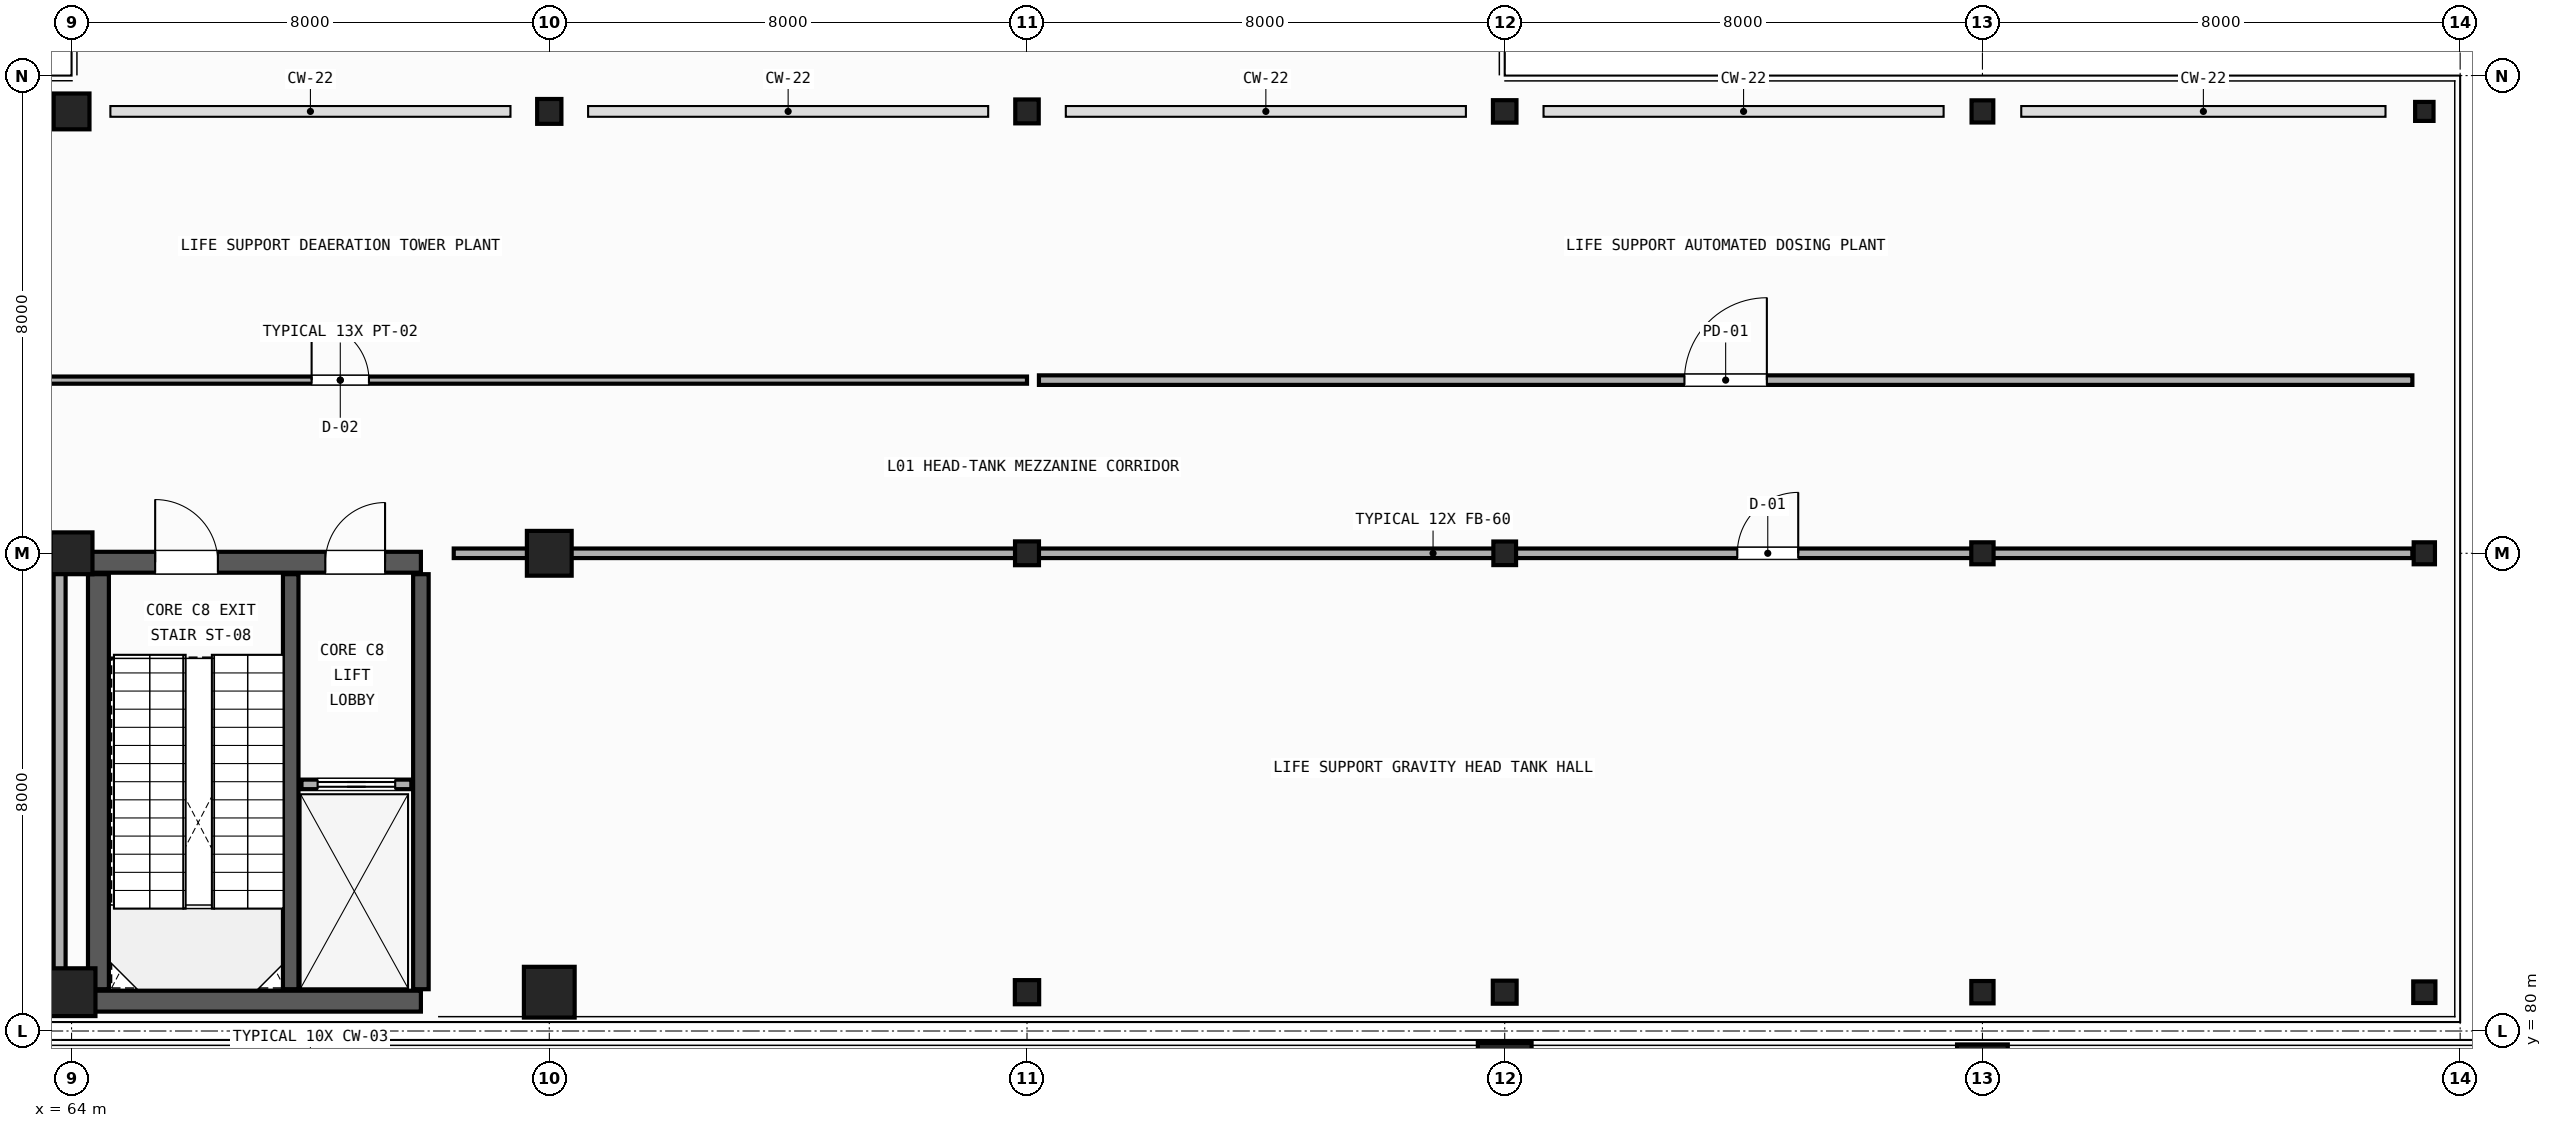
"""IFC4 building model, lengths in metres.
Left out: names, types, materials, properties, quantities, classifications, styles, units other than length and angle.
Written with IfcOpenShell. Run it as: python <this file> out.ifc"""

import sys

from ifc_helpers import new_model, si_unit, direction, frame, frame_2d, origin, origin_2d, place, context, subcontext, project, spatial, rectangle, circle, i_section, extrude, element, fill, save


model = new_model("IFC4")
c1 = context("Model", 3, precision=1e-05, world=origin(), true_north=direction((0.0, 1.0)))
c2 = subcontext(c1, "Body", "Model", "MODEL_VIEW")
j1 = project(units=[si_unit("LENGTHUNIT", "METRE"), si_unit("PLANEANGLEUNIT", "RADIAN")], contexts=[c1])
p1 = place(None, origin())
s1 = spatial("IfcSite", under=j1, at=p1, CompositionType="ELEMENT")
p2 = place(p1, origin())
s2 = spatial("IfcBuilding", under=s1, at=p2, CompositionType="ELEMENT")
p3 = place(p2, frame((0.0, 0.0, 5.4)))
s3 = spatial("IfcBuildingStorey", under=s2, at=p3, CompositionType="ELEMENT", Elevation=5.4)
p4 = place(p3, frame((88.0, 79.35, 0.0), z_axis=(0.0, 0.0, 1.0), x_axis=(1.0, 0.0, 0.0)))
e1 = element("IfcColumn", 1, at=p4, inside=s3, PredefinedType="COLUMN", context=c2, shape_type="SweptSolid", body=[
    extrude(rectangle(XDim=0.9, YDim=0.9, at=origin_2d()), origin(), (0.0, 0.0, 1.0), 4.52),
])
p5 = place(p3, frame((96.0, 79.35, 0.0), z_axis=(0.0, 0.0, 1.0), x_axis=(0.0, 1.0, 0.0)))
e2 = element("IfcColumn", 2, at=p5, inside=s3, PredefinedType="COLUMN", context=c2, shape_type="SweptSolid", body=[
    extrude(circle(Radius=0.425, at=origin_2d()), origin(), (0.0, 0.0, 1.0), 4.52),
])
p6 = place(p3, frame((64.0, 80.65, 0.0), z_axis=(0.0, 0.0, 1.0), x_axis=(0.0, 1.0, 0.0)))
e3 = element("IfcColumn", 3, at=p6, inside=s3, PredefinedType="COLUMN", context=c2, shape_type="SweptSolid", body=[
    extrude(rectangle(XDim=0.8, YDim=0.8, at=origin_2d()), origin(), (0.0, 0.0, 1.0), 4.52),
])
p7 = place(p3, frame((64.0, 88.0, 0.0), z_axis=(0.0, 0.0, 1.0), x_axis=(1.0, 0.0, 0.0)))
e4 = element("IfcColumn", 4, at=p7, inside=s3, PredefinedType="COLUMN", context=c2, shape_type="SweptSolid", body=[
    extrude(rectangle(XDim=0.7, YDim=0.7, at=origin_2d()), origin(), (0.0, 0.0, 1.0), 4.52),
])
p8 = place(p3, frame((64.0, 95.4, 0.0), z_axis=(0.0, 0.0, 1.0), x_axis=(0.0, 1.0, 0.0)))
e5 = element("IfcColumn", 5, at=p8, inside=s3, PredefinedType="COLUMN", context=c2, shape_type="SweptSolid", body=[
    extrude(rectangle(XDim=0.6, YDim=0.6, at=origin_2d()), origin(), (0.0, 0.0, 1.0), 4.52),
])
p9 = place(p3, frame((72.0, 80.65, 0.0), z_axis=(0.0, 0.0, 1.0), x_axis=(1.0, 0.0, 0.0)))
e6 = element("IfcColumn", 6, at=p9, inside=s3, PredefinedType="COLUMN", context=c2, shape_type="SweptSolid", body=[
    extrude(circle(Radius=0.425, at=origin_2d()), origin(), (0.0, 0.0, 1.0), 4.52),
])
p10 = place(p3, frame((72.0, 88.0, 0.0), z_axis=(0.0, 0.0, 1.0), x_axis=(0.0, 1.0, 0.0)))
e7 = element("IfcColumn", 7, at=p10, inside=s3, PredefinedType="COLUMN", context=c2, shape_type="SweptSolid", body=[
    extrude(circle(Radius=0.375, at=origin_2d()), origin(), (0.0, 0.0, 1.0), 4.52),
])
p11 = place(p3, frame((72.0, 95.4, 0.0), z_axis=(0.0, 0.0, 1.0), x_axis=(1.0, 0.0, 0.0)))
e8 = element("IfcColumn", 8, at=p11, inside=s3, PredefinedType="COLUMN", context=c2, shape_type="SweptSolid", body=[
    extrude(i_section(OverallWidth=0.406, OverallDepth=0.416, WebThickness=0.03, FlangeThickness=0.048, FilletRadius=0.015, at=origin_2d()), origin(), (0.0, 0.0, 1.0), 4.8),
])
p12 = place(p3, frame((80.0, 80.65, 0.0), z_axis=(0.0, 0.0, 1.0), x_axis=(0.0, 1.0, 0.0)))
e9 = element("IfcColumn", 9, at=p12, inside=s3, PredefinedType="COLUMN", context=c2, shape_type="SweptSolid", body=[
    extrude(i_section(OverallWidth=0.404, OverallDepth=0.407, WebThickness=0.027, FlangeThickness=0.044, FilletRadius=0.015, at=origin_2d()), origin(), (0.0, 0.0, 1.0), 4.52),
])
p13 = place(p3, frame((80.0, 88.0, 0.0), z_axis=(0.0, 0.0, 1.0), x_axis=(1.0, 0.0, 0.0)))
e10 = element("IfcColumn", 10, at=p13, inside=s3, PredefinedType="COLUMN", context=c2, shape_type="SweptSolid", body=[
    extrude(i_section(OverallWidth=0.401, OverallDepth=0.399, WebThickness=0.025, FlangeThickness=0.04, FilletRadius=0.015, at=origin_2d()), origin(), (0.0, 0.0, 1.0), 4.52),
])
p14 = place(p3, frame((80.0, 95.4, 0.0), z_axis=(0.0, 0.0, 1.0), x_axis=(0.0, 1.0, 0.0)))
e11 = element("IfcColumn", 11, at=p14, inside=s3, PredefinedType="COLUMN", context=c2, shape_type="SweptSolid", body=[
    extrude(i_section(OverallWidth=0.4, OverallDepth=0.393, WebThickness=0.023, FlangeThickness=0.037, FilletRadius=0.015, at=origin_2d()), origin(), (0.0, 0.0, 1.0), 4.8),
])
p15 = place(p3, frame((88.0, 80.65, 0.0), z_axis=(0.0, 0.0, 1.0), x_axis=(1.0, 0.0, 0.0)))
e12 = element("IfcColumn", 12, at=p15, inside=s3, PredefinedType="COLUMN", context=c2, shape_type="SweptSolid", body=[
    extrude(i_section(OverallWidth=0.399, OverallDepth=0.386, WebThickness=0.021, FlangeThickness=0.033, FilletRadius=0.015, at=origin_2d()), origin(), (0.0, 0.0, 1.0), 4.52),
])
p16 = place(p3, frame((88.0, 88.0, 0.0), z_axis=(0.0, 0.0, 1.0), x_axis=(0.0, 1.0, 0.0)))
e13 = element("IfcColumn", 13, at=p16, inside=s3, PredefinedType="COLUMN", context=c2, shape_type="SweptSolid", body=[
    extrude(i_section(OverallWidth=0.395, OverallDepth=0.38, WebThickness=0.019, FlangeThickness=0.03, FilletRadius=0.015, at=origin_2d()), origin(), (0.0, 0.0, 1.0), 4.52),
])
p17 = place(p3, frame((88.0, 95.4, 0.0), z_axis=(0.0, 0.0, 1.0), x_axis=(1.0, 0.0, 0.0)))
e14 = element("IfcColumn", 14, at=p17, inside=s3, PredefinedType="COLUMN", context=c2, shape_type="SweptSolid", body=[
    extrude(i_section(OverallWidth=0.394, OverallDepth=0.376, WebThickness=0.017, FlangeThickness=0.028, FilletRadius=0.015, at=origin_2d()), origin(), (0.0, 0.0, 1.0), 4.8),
])
p18 = place(p3, frame((96.0, 80.65, 0.0), z_axis=(0.0, 0.0, 1.0), x_axis=(0.0, 1.0, 0.0)))
e15 = element("IfcColumn", 15, at=p18, inside=s3, PredefinedType="COLUMN", context=c2, shape_type="SweptSolid", body=[
    extrude(i_section(OverallWidth=0.374, OverallDepth=0.372, WebThickness=0.016, FlangeThickness=0.026, FilletRadius=0.015, at=origin_2d()), origin(), (0.0, 0.0, 1.0), 4.52),
])
p19 = place(p3, frame((96.0, 88.0, 0.0), z_axis=(0.0, 0.0, 1.0), x_axis=(1.0, 0.0, 0.0)))
e16 = element("IfcColumn", 16, at=p19, inside=s3, PredefinedType="COLUMN", context=c2, shape_type="SweptSolid", body=[
    extrude(i_section(OverallWidth=0.373, OverallDepth=0.368, WebThickness=0.015, FlangeThickness=0.024, FilletRadius=0.015, at=origin_2d()), origin(), (0.0, 0.0, 1.0), 4.52),
])
p20 = place(p3, frame((96.0, 95.4, 0.0), z_axis=(0.0, 0.0, 1.0), x_axis=(0.0, 1.0, 0.0)))
e17 = element("IfcColumn", 17, at=p20, inside=s3, PredefinedType="COLUMN", context=c2, shape_type="SweptSolid", body=[
    extrude(i_section(OverallWidth=0.371, OverallDepth=0.364, WebThickness=0.013, FlangeThickness=0.022, FilletRadius=0.015, at=origin_2d()), origin(), (0.0, 0.0, 1.0), 4.8),
])
p21 = place(p3, frame((103.4, 80.65, 0.0), z_axis=(0.0, 0.0, 1.0), x_axis=(1.0, 0.0, 0.0)))
e18 = element("IfcColumn", 18, at=p21, inside=s3, PredefinedType="COLUMN", context=c2, shape_type="SweptSolid", body=[
    extrude(i_section(OverallWidth=0.371, OverallDepth=0.361, WebThickness=0.012, FlangeThickness=0.02, FilletRadius=0.015, at=origin_2d()), origin(), (0.0, 0.0, 1.0), 4.8),
])
p22 = place(p3, frame((103.4, 88.0, 0.0), z_axis=(0.0, 0.0, 1.0), x_axis=(0.0, 1.0, 0.0)))
e19 = element("IfcColumn", 19, at=p22, inside=s3, PredefinedType="COLUMN", context=c2, shape_type="SweptSolid", body=[
    extrude(i_section(OverallWidth=0.368, OverallDepth=0.356, WebThickness=0.011, FlangeThickness=0.018, FilletRadius=0.015, at=origin_2d()), origin(), (0.0, 0.0, 1.0), 4.8),
])
p23 = place(p3, frame((103.4, 95.4, 0.0), z_axis=(0.0, 0.0, 1.0), x_axis=(1.0, 0.0, 0.0)))
e20 = element("IfcColumn", 20, at=p23, inside=s3, PredefinedType="COLUMN", context=c2, shape_type="SweptSolid", body=[
    extrude(i_section(OverallWidth=0.308, OverallDepth=0.318, WebThickness=0.013, FlangeThickness=0.021, FilletRadius=0.013, at=origin_2d()), origin(), (0.0, 0.0, 1.0), 4.8),
])
p24 = place(p3, frame((64.0, 87.85, 0.0), z_axis=(0.0, 0.0, 1.0), x_axis=(1.0, 0.0, 0.0)))
e21 = element("IfcWall", 21, at=p24, inside=s3, PredefinedType="SHEAR", context=c2, shape_type="SweptSolid", body=[
    extrude(rectangle(XDim=5.85, YDim=0.35, at=frame_2d((2.925, 0.0))), origin(), (0.0, 0.0, 1.0), 4.51),
])
p25 = place(p24, frame((1.4, 0.0, 0.0)))
e22 = element("IfcOpeningElement", 22, at=p25, cuts=e21, PredefinedType="OPENING", context=c2, shape_type="SweptSolid", body=[
    extrude(rectangle(XDim=1.05, YDim=2.1, at=frame_2d((0.525, 1.05))), frame((0.0, 0.185, 0.0), z_axis=(0.0, -1.0, 0.0), x_axis=(1.0, 0.0, 0.0)), (0.0, 0.0, 1.0), 0.37),
])
p26 = place(p24, frame((4.25, 0.0, 0.0)))
e23 = element("IfcOpeningElement", 23, at=p26, cuts=e21, PredefinedType="OPENING", context=c2, shape_type="SweptSolid", body=[
    extrude(rectangle(XDim=1.0, YDim=2.15, at=frame_2d((0.5, 1.075))), frame((0.0, 0.185, 0.0), z_axis=(0.0, -1.0, 0.0), x_axis=(1.0, 0.0, 0.0)), (0.0, 0.0, 1.0), 0.37),
])
p27 = place(p3, frame((64.0, 80.5, 0.0), z_axis=(0.0, 0.0, 1.0), x_axis=(1.0, 0.0, 0.0)))
e24 = element("IfcWall", 24, at=p27, inside=s3, PredefinedType="SHEAR", context=c2, shape_type="SweptSolid", body=[
    extrude(rectangle(XDim=5.85, YDim=0.35, at=frame_2d((2.925, 0.0))), origin(), (0.0, 0.0, 1.0), 4.51),
])
p28 = place(p3, frame((64.45, 80.7, 0.0), z_axis=(0.0, 0.0, 1.0), x_axis=(0.0, 1.0, 0.0)))
e25 = element("IfcWall", 25, at=p28, inside=s3, PredefinedType="SHEAR", context=c2, shape_type="SweptSolid", body=[
    extrude(rectangle(XDim=6.95, YDim=0.35, at=frame_2d((3.475, 0.0))), origin(), (0.0, 0.0, 1.0), 4.51),
])
for number, where, z_axis, x_axis in (
    (26, (69.85, 80.7, 0.0), (0.0, 0.0, 1.0), (0.0, 1.0, 0.0)),
    (27, (67.67, 80.7, 0.0), (0.0, 0.0, 1.0), (0.0, 1.0, 0.0)),
):
    element("IfcWall", number, at=place(p3, frame(where, z_axis=z_axis, x_axis=x_axis)), inside=s3, PredefinedType="SHEAR", context=c2, shape_type="SweptSolid", body=[
        extrude(rectangle(XDim=6.95, YDim=0.26, at=frame_2d((3.475, 0.0))), origin(), (0.0, 0.0, 1.0), 4.51),
    ])
p29 = place(p3, frame((67.85, 84.13, 0.0), z_axis=(0.0, 0.0, 1.0), x_axis=(1.0, 0.0, 0.0)))
e28 = element("IfcWall", 28, at=p29, inside=s3, PredefinedType="PARTITIONING", context=c2, shape_type="SweptSolid", body=[
    extrude(rectangle(XDim=1.84, YDim=0.16, at=frame_2d((0.92, 0.0))), origin(), (0.0, 0.0, 1.0), 3.6),
])
p30 = place(p29, frame((0.27, 0.0, 0.0)))
e29 = element("IfcOpeningElement", 29, at=p30, cuts=e28, PredefinedType="OPENING", context=c2, shape_type="SweptSolid", body=[
    extrude(rectangle(XDim=1.3, YDim=2.2, at=frame_2d((0.65, 1.1))), frame((0.0, 0.09, 0.0), z_axis=(0.0, -1.0, 0.0), x_axis=(1.0, 0.0, 0.0)), (0.0, 0.0, 1.0), 0.18),
])
p31 = place(p3, frame((57.0, 88.0, 0.0), z_axis=(0.0, 0.0, 1.0), x_axis=(1.0, 0.0, 0.0)))
e30 = element("IfcWall", 30, at=p31, inside=s3, PredefinedType="PLUMBINGWALL", context=c2, shape_type="SweptSolid", body=[
    extrude(rectangle(XDim=6.8, YDim=0.2, at=frame_2d((3.4, 0.0))), origin(), (0.0, 0.0, 1.0), 3.868),
])
p32 = place(p31, frame((2.945, 0.0, 0.0)))
e31 = element("IfcOpeningElement", 31, at=p32, cuts=e30, PredefinedType="OPENING", context=c2, shape_type="SweptSolid", body=[
    extrude(rectangle(XDim=0.91, YDim=2.1, at=frame_2d((0.455, 1.05))), frame((0.0, 0.11, 0.0), z_axis=(0.0, -1.0, 0.0), x_axis=(1.0, 0.0, 0.0)), (0.0, 0.0, 1.0), 0.22),
])
p33 = place(p3, frame((57.0, 80.8, 0.0), z_axis=(0.0, 0.0, 1.0), x_axis=(1.0, 0.0, 0.0)))
e32 = element("IfcWall", 32, at=p33, inside=s3, PredefinedType="PLUMBINGWALL", context=c2, shape_type="SweptSolid", body=[
    extrude(rectangle(XDim=6.8, YDim=0.2, at=frame_2d((3.4, 0.0))), origin(), (0.0, 0.0, 1.0), 3.952),
])
p34 = place(p3, frame((63.8, 80.8, 0.0), z_axis=(0.0, 0.0, 1.0), x_axis=(0.0, 1.0, 0.0)))
e33 = element("IfcWall", 33, at=p34, inside=s3, PredefinedType="PLUMBINGWALL", context=c2, shape_type="SweptSolid", body=[
    extrude(rectangle(XDim=7.2, YDim=0.2, at=frame_2d((3.6, 0.0))), origin(), (0.0, 0.0, 1.0), 3.878),
])
p35 = place(p3, frame((70.4, 88.0, 0.0), z_axis=(0.0, 0.0, 1.0), x_axis=(1.0, 0.0, 0.0)))
e34 = element("IfcWall", 34, at=p35, inside=s3, PredefinedType="PARTITIONING", context=c2, shape_type="SweptSolid", body=[
    extrude(rectangle(XDim=32.8, YDim=0.16, at=frame_2d((16.4, 0.0))), origin(), (0.0, 0.0, 1.0), 3.718),
])
p36 = place(p35, frame((21.495, 0.0, 0.0)))
e35 = element("IfcOpeningElement", 35, at=p36, cuts=e34, PredefinedType="OPENING", context=c2, shape_type="SweptSolid", body=[
    extrude(rectangle(XDim=1.02, YDim=2.15, at=frame_2d((0.51, 1.075))), frame((0.0, 0.09, 0.0), z_axis=(0.0, -1.0, 0.0), x_axis=(1.0, 0.0, 0.0)), (0.0, 0.0, 1.0), 0.18),
])
p37 = place(p3, frame((57.0, 90.9, 0.0), z_axis=(0.0, 0.0, 1.0), x_axis=(1.0, 0.0, 0.0)))
e36 = element("IfcWall", 36, at=p37, inside=s3, PredefinedType="PARTITIONING", context=c2, shape_type="SweptSolid", body=[
    extrude(rectangle(XDim=23.0, YDim=0.12, at=frame_2d((11.5, 0.0))), origin(), (0.0, 0.0, 1.0), 3.718),
])
p38 = place(p37, frame((11.02, 0.0, 0.0)))
e37 = element("IfcOpeningElement", 37, at=p38, cuts=e36, PredefinedType="OPENING", context=c2, shape_type="SweptSolid", body=[
    extrude(rectangle(XDim=0.96, YDim=2.1, at=frame_2d((0.48, 1.05))), frame((0.0, 0.07, 0.0), z_axis=(0.0, -1.0, 0.0), x_axis=(1.0, 0.0, 0.0)), (0.0, 0.0, 1.0), 0.14),
])
p39 = place(p3, frame((80.2, 90.9, 0.0), z_axis=(0.0, 0.0, 1.0), x_axis=(1.0, 0.0, 0.0)))
e38 = element("IfcWall", 38, at=p39, inside=s3, PredefinedType="PARTITIONING", context=c2, shape_type="SweptSolid", body=[
    extrude(rectangle(XDim=23.0, YDim=0.16, at=frame_2d((11.5, 0.0))), origin(), (0.0, 0.0, 1.0), 3.797),
])
p40 = place(p39, frame((10.81, 0.0, 0.0)))
e39 = element("IfcOpeningElement", 39, at=p40, cuts=e38, PredefinedType="OPENING", context=c2, shape_type="SweptSolid", body=[
    extrude(rectangle(XDim=1.38, YDim=2.25, at=frame_2d((0.69, 1.125))), frame((0.0, 0.09, 0.0), z_axis=(0.0, -1.0, 0.0), x_axis=(1.0, 0.0, 0.0)), (0.0, 0.0, 1.0), 0.18),
])
p41 = place(p30, origin())
e40 = element("IfcDoor", 40, at=p41, inside=s3, OperationType="SLIDING_TO_LEFT", PredefinedType="DOOR", context=c2, shape_type="SweptSolid", body=[
    extrude(rectangle(XDim=1.3, YDim=2.2, at=frame_2d((0.65, 1.1))), frame((0.0, 0.025, 0.0), z_axis=(0.0, -1.0, 0.0), x_axis=(1.0, 0.0, 0.0)), (0.0, 0.0, 1.0), 0.05),
])
fill(e29, e40)
p42 = place(p25, origin())
e41 = element("IfcDoor", 41, at=p42, inside=s3, OperationType="SINGLE_SWING_LEFT", PredefinedType="DOOR", context=c2, shape_type="SweptSolid", body=[
    extrude(rectangle(XDim=1.05, YDim=2.1, at=frame_2d((0.525, 1.05))), frame((0.0, 0.025, 0.0), z_axis=(0.0, -1.0, 0.0), x_axis=(1.0, 0.0, 0.0)), (0.0, 0.0, 1.0), 0.05),
])
fill(e22, e41)
p43 = place(p26, origin())
e42 = element("IfcDoor", 42, at=p43, inside=s3, OperationType="SINGLE_SWING_RIGHT", PredefinedType="DOOR", context=c2, shape_type="SweptSolid", body=[
    extrude(rectangle(XDim=1.0, YDim=2.15, at=frame_2d((0.5, 1.075))), frame((0.0, 0.025, 0.0), z_axis=(0.0, -1.0, 0.0), x_axis=(1.0, 0.0, 0.0)), (0.0, 0.0, 1.0), 0.05),
])
fill(e23, e42)
p44 = place(p36, origin())
e43 = element("IfcDoor", 43, at=p44, inside=s3, OperationType="SINGLE_SWING_RIGHT", PredefinedType="DOOR", context=c2, shape_type="SweptSolid", body=[
    extrude(rectangle(XDim=1.02, YDim=2.15, at=frame_2d((0.51, 1.075))), frame((0.0, 0.025, 0.0), z_axis=(0.0, -1.0, 0.0), x_axis=(1.0, 0.0, 0.0)), (0.0, 0.0, 1.0), 0.05),
])
fill(e35, e43)
p45 = place(p38, origin())
e44 = element("IfcDoor", 44, at=p45, inside=s3, OperationType="SINGLE_SWING_LEFT", PredefinedType="DOOR", context=c2, shape_type="SweptSolid", body=[
    extrude(rectangle(XDim=0.96, YDim=2.1, at=frame_2d((0.48, 1.05))), frame((0.0, 0.025, 0.0), z_axis=(0.0, -1.0, 0.0), x_axis=(1.0, 0.0, 0.0)), (0.0, 0.0, 1.0), 0.05),
])
fill(e37, e44)
p46 = place(p40, origin())
e45 = element("IfcDoor", 45, at=p46, inside=s3, OperationType="SINGLE_SWING_RIGHT", PredefinedType="DOOR", context=c2, shape_type="SweptSolid", body=[
    extrude(rectangle(XDim=1.38, YDim=2.25, at=frame_2d((0.69, 1.125))), frame((0.0, 0.025, 0.0), z_axis=(0.0, -1.0, 0.0), x_axis=(1.0, 0.0, 0.0)), (0.0, 0.0, 1.0), 0.05),
])
fill(e39, e45)
save(model, sys.argv[1])
